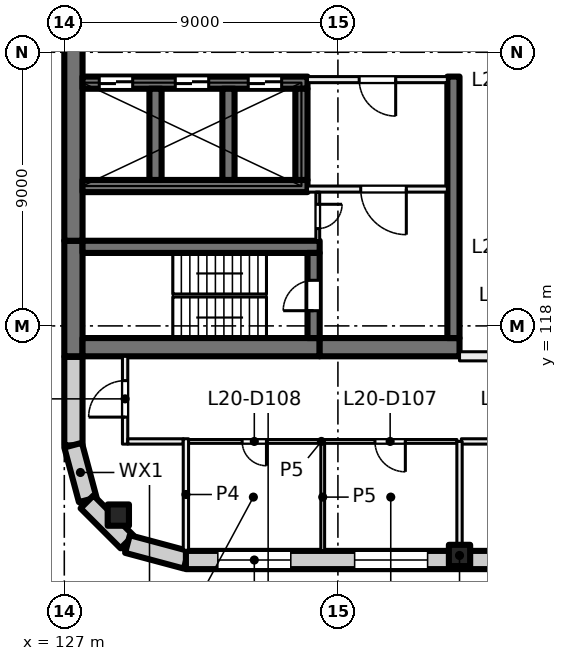
"""IFC4 building model, lengths in metres.
Left out: names, types, materials, properties, quantities, classifications, styles, units other than length and angle.
Written with IfcOpenShell. Run it as: python <this file> out.ifc"""

import sys

from ifc_helpers import new_model, si_unit, direction, frame, frame_2d, origin, origin_2d, place, context, subcontext, project, spatial, rectangle, extrude, element, fill, save


model = new_model("IFC4")
c1 = context("Model", 3, precision=1e-05, world=origin(), true_north=direction((0.0, 1.0)))
c2 = subcontext(c1, "Body", "Model", "MODEL_VIEW")
j1 = project(units=[si_unit("LENGTHUNIT", "METRE"), si_unit("PLANEANGLEUNIT", "RADIAN")], contexts=[c1])
p1 = place(None, origin())
s1 = spatial("IfcSite", under=j1, at=p1, CompositionType="ELEMENT")
p2 = place(p1, origin())
s2 = spatial("IfcBuilding", under=s1, at=p2, CompositionType="ELEMENT")
p3 = place(p2, frame((0.0, 0.0, 89.0)))
s3 = spatial("IfcBuildingStorey", under=s2, at=p3, CompositionType="ELEMENT", Elevation=89.0)
for number, where, z_axis, x_axis in (
    (1, (128.777, 111.777, 0.0), (0.0, 0.0, 1.0), (1.0, 0.0, 0.0)),
    (2, (140.0, 110.45, 0.0), (0.0, 0.0, 1.0), (1.0, 0.0, 0.0)),
):
    element("IfcColumn", number, at=place(p3, frame(where, z_axis=z_axis, x_axis=x_axis)), inside=s3, PredefinedType="COLUMN", context=c2, shape_type="SweptSolid", body=[
        extrude(rectangle(XDim=0.7, YDim=0.7, at=origin_2d()), origin(), (0.0, 0.0, 1.0), 4.0),
    ])
p4 = place(p3, frame((127.3, 117.0, 0.0), z_axis=(0.0, 0.0, 1.0), x_axis=(0.0, 1.0, 0.0)))
e3 = element("IfcWall", 3, at=p4, inside=s3, PredefinedType="SHEAR", context=c2, shape_type="SweptSolid", body=[
    extrude(rectangle(XDim=3.8, YDim=0.6, at=frame_2d((1.9, 0.0))), origin(), (0.0, 0.0, 1.0), 4.0),
])
p5 = place(p3, frame((127.3, 120.8, 0.0), z_axis=(0.0, 0.0, 1.0), x_axis=(0.0, 1.0, 0.0)))
e4 = element("IfcWall", 4, at=p5, inside=s3, PredefinedType="SHEAR", context=c2, shape_type="SweptSolid", body=[
    extrude(rectangle(XDim=14.4, YDim=0.6, at=frame_2d((7.2, 0.0))), origin(), (0.0, 0.0, 1.0), 4.0),
])
p6 = place(p3, frame((127.6, 117.3, 0.0), z_axis=(0.0, 0.0, 1.0), x_axis=(1.0, 0.0, 0.0)))
e5 = element("IfcWall", 5, at=p6, inside=s3, PredefinedType="SHEAR", context=c2, shape_type="SweptSolid", body=[
    extrude(rectangle(XDim=7.8, YDim=0.6, at=frame_2d((3.9, 0.0))), origin(), (0.0, 0.0, 1.0), 4.0),
])
p7 = place(p3, frame((135.4, 117.3, 0.0), z_axis=(0.0, 0.0, 1.0), x_axis=(1.0, 0.0, 0.0)))
e6 = element("IfcWall", 6, at=p7, inside=s3, PredefinedType="SHEAR", context=c2, shape_type="SweptSolid", body=[
    extrude(rectangle(XDim=4.6, YDim=0.6, at=frame_2d((2.3, 0.0))), origin(), (0.0, 0.0, 1.0), 4.0),
])
p8 = place(p3, frame((127.6, 120.6, 0.0), z_axis=(0.0, 0.0, 1.0), x_axis=(1.0, 0.0, 0.0)))
e7 = element("IfcWall", 7, at=p8, inside=s3, PredefinedType="SHEAR", context=c2, shape_type="SweptSolid", body=[
    extrude(rectangle(XDim=7.8, YDim=0.4, at=frame_2d((3.9, 0.0))), origin(), (0.0, 0.0, 1.0), 4.0),
])
p9 = place(p3, frame((135.2, 117.6, 0.0), z_axis=(0.0, 0.0, 1.0), x_axis=(0.0, 1.0, 0.0)))
e8 = element("IfcWall", 8, at=p9, inside=s3, PredefinedType="SHEAR", context=c2, shape_type="SweptSolid", body=[
    extrude(rectangle(XDim=2.8, YDim=0.4, at=frame_2d((1.4, 0.0))), origin(), (0.0, 0.0, 1.0), 4.0),
])
p10 = place(p9, frame((0.9, 0.0, 0.0)))
e9 = element("IfcOpeningElement", 9, at=p10, cuts=e8, PredefinedType="OPENING", context=c2, shape_type="SweptSolid", body=[
    extrude(rectangle(XDim=1.0, YDim=2.1, at=frame_2d((0.5, 1.05))), frame((0.0, 0.21, 0.0), z_axis=(0.0, -1.0, 0.0), x_axis=(1.0, 0.0, 0.0)), (0.0, 0.0, 1.0), 0.42),
])
p11 = place(p3, frame((127.6, 126.0, 0.0), z_axis=(0.0, 0.0, 1.0), x_axis=(1.0, 0.0, 0.0)))
e10 = element("IfcWall", 10, at=p11, inside=s3, PredefinedType="SHEAR", context=c2, shape_type="SweptSolid", body=[
    extrude(rectangle(XDim=7.4, YDim=0.4, at=frame_2d((3.7, 0.0))), origin(), (0.0, 0.0, 1.0), 4.0),
])
p12 = place(p11, frame((0.55, 0.0, 0.0)))
e11 = element("IfcOpeningElement", 11, at=p12, cuts=e10, PredefinedType="OPENING", context=c2, shape_type="SweptSolid", body=[
    extrude(rectangle(XDim=1.1, YDim=2.1, at=frame_2d((0.55, 1.05))), frame((0.0, 0.21, 0.0), z_axis=(0.0, -1.0, 0.0), x_axis=(1.0, 0.0, 0.0)), (0.0, 0.0, 1.0), 0.42),
])
p13 = place(p11, frame((3.05, 0.0, 0.0)))
e12 = element("IfcOpeningElement", 12, at=p13, cuts=e10, PredefinedType="OPENING", context=c2, shape_type="SweptSolid", body=[
    extrude(rectangle(XDim=1.1, YDim=2.1, at=frame_2d((0.55, 1.05))), frame((0.0, 0.21, 0.0), z_axis=(0.0, -1.0, 0.0), x_axis=(1.0, 0.0, 0.0)), (0.0, 0.0, 1.0), 0.42),
])
p14 = place(p11, frame((5.45, 0.0, 0.0)))
e13 = element("IfcOpeningElement", 13, at=p14, cuts=e10, PredefinedType="OPENING", context=c2, shape_type="SweptSolid", body=[
    extrude(rectangle(XDim=1.1, YDim=2.1, at=frame_2d((0.55, 1.05))), frame((0.0, 0.21, 0.0), z_axis=(0.0, -1.0, 0.0), x_axis=(1.0, 0.0, 0.0)), (0.0, 0.0, 1.0), 0.42),
])
p15 = place(p3, frame((127.6, 122.6, 0.0), z_axis=(0.0, 0.0, 1.0), x_axis=(1.0, 0.0, 0.0)))
e14 = element("IfcWall", 14, at=p15, inside=s3, PredefinedType="SHEAR", context=c2, shape_type="SweptSolid", body=[
    extrude(rectangle(XDim=7.4, YDim=0.4, at=frame_2d((3.7, 0.0))), origin(), (0.0, 0.0, 1.0), 4.0),
])
for number, where, z_axis, x_axis in (
    (15, (130.0, 122.8, 0.0), (0.0, 0.0, 1.0), (0.0, 1.0, 0.0)),
    (16, (132.4, 122.8, 0.0), (0.0, 0.0, 1.0), (0.0, 1.0, 0.0)),
    (17, (134.8, 122.8, 0.0), (0.0, 0.0, 1.0), (0.0, 1.0, 0.0)),
):
    element("IfcWall", number, at=place(p3, frame(where, z_axis=z_axis, x_axis=x_axis)), inside=s3, PredefinedType="SHEAR", context=c2, shape_type="SweptSolid", body=[
        extrude(rectangle(XDim=3.0, YDim=0.4, at=frame_2d((1.5, 0.0))), origin(), (0.0, 0.0, 1.0), 4.0),
    ])
p16 = place(p3, frame((139.8, 117.6, 0.0), z_axis=(0.0, 0.0, 1.0), x_axis=(0.0, 1.0, 0.0)))
e18 = element("IfcWall", 18, at=p16, inside=s3, PredefinedType="SHEAR", context=c2, shape_type="SweptSolid", body=[
    extrude(rectangle(XDim=8.6, YDim=0.4, at=frame_2d((4.3, 0.0))), origin(), (0.0, 0.0, 1.0), 4.0),
])
p17 = place(p3, frame((127.3, 114.07, 0.0), z_axis=(0.0, 0.0, 1.0), x_axis=(0.0, 1.0, 0.0)))
e19 = element("IfcWall", 19, at=p17, inside=s3, PredefinedType="SOLIDWALL", context=c2, shape_type="SweptSolid", body=[
    extrude(rectangle(XDim=2.91, YDim=0.6, at=frame_2d((1.455, 0.0))), origin(), (0.0, 0.0, 1.0), 3.625),
])
for number, where, z_axis, x_axis in (
    (20, (127.771, 112.281, 0.0), (0.0, 0.0, 1.0), (-0.259, 0.966, 0.0)),
    (21, (129.064, 110.896, 0.0), (0.0, 0.0, 1.0), (-0.707, 0.707, 0.0)),
):
    element("IfcWall", number, at=place(p3, frame(where, z_axis=z_axis, x_axis=x_axis)), inside=s3, PredefinedType="SOLIDWALL", context=c2, shape_type="SweptSolid", body=[
        extrude(rectangle(XDim=1.861, YDim=0.6, at=frame_2d((0.93, 0.0))), origin(), (0.0, 0.0, 1.0), 3.625),
    ])
p18 = place(p3, frame((131.01, 110.308, 0.0), z_axis=(0.0, 0.0, 1.0), x_axis=(-0.965920269068, 0.258839784042, 0.0)))
e22 = element("IfcWall", 22, at=p18, inside=s3, PredefinedType="SOLIDWALL", context=c2, shape_type="SweptSolid", body=[
    extrude(rectangle(XDim=2.0, YDim=0.6, at=frame_2d((1.0, 0.0))), origin(), (0.0, 0.0, 1.0), 3.625),
])
p19 = place(p3, frame((144.93, 110.3, 0.0), z_axis=(0.0, 0.0, 1.0), x_axis=(-1.0, 0.0, 0.0)))
e23 = element("IfcWall", 23, at=p19, inside=s3, PredefinedType="SOLIDWALL", context=c2, shape_type="SweptSolid", body=[
    extrude(rectangle(XDim=13.93, YDim=0.6, at=frame_2d((6.965, 0.0))), origin(), (0.0, 0.0, 1.0), 3.625),
])
p20 = place(p19, frame((1.48, 0.0, 0.9)))
e24 = element("IfcOpeningElement", 24, at=p20, cuts=e23, PredefinedType="OPENING", context=c2, shape_type="SweptSolid", body=[
    extrude(rectangle(XDim=2.4, YDim=2.4, at=frame_2d((1.2, 1.2))), frame((0.0, 0.31, 0.0), z_axis=(0.0, -1.0, 0.0), x_axis=(1.0, 0.0, 0.0)), (0.0, 0.0, 1.0), 0.62),
])
p21 = place(p19, frame((5.98, 0.0, 0.9)))
e25 = element("IfcOpeningElement", 25, at=p21, cuts=e23, PredefinedType="OPENING", context=c2, shape_type="SweptSolid", body=[
    extrude(rectangle(XDim=2.4, YDim=2.4, at=frame_2d((1.2, 1.2))), frame((0.0, 0.31, 0.0), z_axis=(0.0, -1.0, 0.0), x_axis=(1.0, 0.0, 0.0)), (0.0, 0.0, 1.0), 0.62),
])
p22 = place(p19, frame((10.48, 0.0, 0.9)))
e26 = element("IfcOpeningElement", 26, at=p22, cuts=e23, PredefinedType="OPENING", context=c2, shape_type="SweptSolid", body=[
    extrude(rectangle(XDim=2.4, YDim=2.4, at=frame_2d((1.2, 1.2))), frame((0.0, 0.31, 0.0), z_axis=(0.0, -1.0, 0.0), x_axis=(1.0, 0.0, 0.0)), (0.0, 0.0, 1.0), 0.62),
])
p23 = place(p3, frame((139.6, 126.1, 0.0), z_axis=(0.0, 0.0, 1.0), x_axis=(-1.0, 0.0, 0.0)))
e27 = element("IfcWall", 27, at=p23, inside=s3, PredefinedType="PARTITIONING", context=c2, shape_type="SweptSolid", body=[
    extrude(rectangle(XDim=4.6, YDim=0.2, at=frame_2d((2.3, 0.0))), origin(), (0.0, 0.0, 1.0), 3.625),
])
p24 = place(p23, frame((1.7, 0.0, 0.0)))
e28 = element("IfcOpeningElement", 28, at=p24, cuts=e27, PredefinedType="OPENING", context=c2, shape_type="SweptSolid", body=[
    extrude(rectangle(XDim=1.2, YDim=2.1, at=frame_2d((0.6, 1.05))), frame((0.0, 0.11, 0.0), z_axis=(0.0, -1.0, 0.0), x_axis=(1.0, 0.0, 0.0)), (0.0, 0.0, 1.0), 0.22),
])
p25 = place(p3, frame((139.6, 122.5, 0.0), z_axis=(0.0, 0.0, 1.0), x_axis=(-1.0, 0.0, 0.0)))
e29 = element("IfcWall", 29, at=p25, inside=s3, PredefinedType="PARTITIONING", context=c2, shape_type="SweptSolid", body=[
    extrude(rectangle(XDim=4.6, YDim=0.2, at=frame_2d((2.3, 0.0))), origin(), (0.0, 0.0, 1.0), 3.625),
])
p26 = place(p25, frame((1.35, 0.0, 0.0)))
e30 = element("IfcOpeningElement", 30, at=p26, cuts=e29, PredefinedType="OPENING", context=c2, shape_type="SweptSolid", body=[
    extrude(rectangle(XDim=1.5, YDim=2.1, at=frame_2d((0.75, 1.05))), frame((0.0, 0.11, 0.0), z_axis=(0.0, -1.0, 0.0), x_axis=(1.0, 0.0, 0.0)), (0.0, 0.0, 1.0), 0.22),
])
p27 = place(p3, frame((135.337, 122.4, 0.0), z_axis=(0.0, 0.0, 1.0), x_axis=(0.0, -1.0, 0.0)))
e31 = element("IfcWall", 31, at=p27, inside=s3, PredefinedType="PARTITIONING", context=c2, shape_type="SweptSolid", body=[
    extrude(rectangle(XDim=1.6, YDim=0.125, at=frame_2d((0.8, 0.0))), origin(), (0.0, 0.0, 1.0), 3.625),
])
p28 = place(p27, frame((0.4, 0.0, 0.0)))
e32 = element("IfcOpeningElement", 32, at=p28, cuts=e31, PredefinedType="OPENING", context=c2, shape_type="SweptSolid", body=[
    extrude(rectangle(XDim=0.8, YDim=2.1, at=frame_2d((0.4, 1.05))), frame((0.0, 0.073, 0.0), z_axis=(0.0, -1.0, 0.0), x_axis=(1.0, 0.0, 0.0)), (0.0, 0.0, 1.0), 0.145),
])
p29 = place(p3, frame((129.0, 114.112, 0.0), z_axis=(0.0, 0.0, 1.0), x_axis=(0.0, 1.0, 0.0)))
e33 = element("IfcWall", 33, at=p29, inside=s3, PredefinedType="PARTITIONING", context=c2, shape_type="SweptSolid", body=[
    extrude(rectangle(XDim=2.888, YDim=0.175, at=frame_2d((1.444, 0.0))), origin(), (0.0, 0.0, 1.0), 3.625),
])
p30 = place(p29, frame((0.888, 0.0, 0.0)))
e34 = element("IfcOpeningElement", 34, at=p30, cuts=e33, PredefinedType="OPENING", context=c2, shape_type="SweptSolid", body=[
    extrude(rectangle(XDim=1.2, YDim=2.1, at=frame_2d((0.6, 1.05))), frame((0.0, 0.097, 0.0), z_axis=(0.0, -1.0, 0.0), x_axis=(1.0, 0.0, 0.0)), (0.0, 0.0, 1.0), 0.195),
])
p31 = place(p3, frame((130.912, 114.2, 0.0), z_axis=(0.0, 0.0, 1.0), x_axis=(-1.0, 0.0, 0.0)))
e35 = element("IfcWall", 35, at=p31, inside=s3, PredefinedType="PARTITIONING", context=c2, shape_type="SweptSolid", body=[
    extrude(rectangle(XDim=1.824, YDim=0.175, at=frame_2d((0.912, 0.0))), origin(), (0.0, 0.0, 1.0), 3.625),
])
p32 = place(p3, frame((139.916, 114.2, 0.0), z_axis=(0.0, 0.0, 1.0), x_axis=(-1.0, 0.0, 0.0)))
e36 = element("IfcWall", 36, at=p32, inside=s3, PredefinedType="PARTITIONING", context=c2, shape_type="SweptSolid", body=[
    extrude(rectangle(XDim=8.919, YDim=0.125, at=frame_2d((4.459, 0.0))), origin(), (0.0, 0.0, 1.0), 3.625),
])
p33 = place(p32, frame((1.698, 0.0, 0.0)))
e37 = element("IfcOpeningElement", 37, at=p33, cuts=e36, PredefinedType="OPENING", context=c2, shape_type="SweptSolid", body=[
    extrude(rectangle(XDim=1.0, YDim=2.1, at=frame_2d((0.5, 1.05))), frame((0.0, 0.073, 0.0), z_axis=(0.0, -1.0, 0.0), x_axis=(1.0, 0.0, 0.0)), (0.0, 0.0, 1.0), 0.145),
])
p34 = place(p32, frame((6.266, 0.0, 0.0)))
e38 = element("IfcOpeningElement", 38, at=p34, cuts=e36, PredefinedType="OPENING", context=c2, shape_type="SweptSolid", body=[
    extrude(rectangle(XDim=0.8, YDim=2.1, at=frame_2d((0.4, 1.05))), frame((0.0, 0.073, 0.0), z_axis=(0.0, -1.0, 0.0), x_axis=(1.0, 0.0, 0.0)), (0.0, 0.0, 1.0), 0.145),
])
p35 = place(p3, frame((131.0, 114.288, 0.0), z_axis=(0.0, 0.0, 1.0), x_axis=(0.0, -1.0, 0.0)))
e39 = element("IfcWall", 39, at=p35, inside=s3, PredefinedType="PARTITIONING", context=c2, shape_type="SweptSolid", body=[
    extrude(rectangle(XDim=3.667, YDim=0.175, at=frame_2d((1.833, 0.0))), origin(), (0.0, 0.0, 1.0), 3.625),
])
p36 = place(p3, frame((135.5, 110.6, 0.0), z_axis=(0.0, 0.0, 1.0), x_axis=(0.0, 1.0, 0.0)))
e40 = element("IfcWall", 40, at=p36, inside=s3, PredefinedType="PARTITIONING", context=c2, shape_type="SweptSolid", body=[
    extrude(rectangle(XDim=3.538, YDim=0.125, at=frame_2d((1.769, 0.0))), origin(), (0.0, 0.0, 1.0), 3.625),
])
p37 = place(p3, frame((144.412, 114.2, 0.0), z_axis=(0.0, 0.0, 1.0), x_axis=(-1.0, 0.0, 0.0)))
e41 = element("IfcWall", 41, at=p37, inside=s3, PredefinedType="PARTITIONING", context=c2, shape_type="SweptSolid", body=[
    extrude(rectangle(XDim=4.352, YDim=0.175, at=frame_2d((2.176, 0.0))), origin(), (0.0, 0.0, 1.0), 3.625),
])
p38 = place(p37, frame((1.576, 0.0, 0.0)))
e42 = element("IfcOpeningElement", 42, at=p38, cuts=e41, PredefinedType="OPENING", context=c2, shape_type="SweptSolid", body=[
    extrude(rectangle(XDim=1.2, YDim=2.1, at=frame_2d((0.6, 1.05))), frame((0.0, 0.097, 0.0), z_axis=(0.0, -1.0, 0.0), x_axis=(1.0, 0.0, 0.0)), (0.0, 0.0, 1.0), 0.195),
])
p39 = place(p3, frame((140.0, 110.6, 0.0), z_axis=(0.0, 0.0, 1.0), x_axis=(0.0, 1.0, 0.0)))
e43 = element("IfcWall", 43, at=p39, inside=s3, PredefinedType="PARTITIONING", context=c2, shape_type="SweptSolid", body=[
    extrude(rectangle(XDim=3.6, YDim=0.175, at=frame_2d((1.8, 0.0))), origin(), (0.0, 0.0, 1.0), 3.625),
])
p40 = place(p3, frame((140.0, 117.0, 0.0), z_axis=(0.0, 0.0, 1.0), x_axis=(1.0, 0.0, 0.0)))
e44 = element("IfcWall", 44, at=p40, inside=s3, PredefinedType="PARTITIONING", context=c2, shape_type="SweptSolid", body=[
    extrude(rectangle(XDim=4.35, YDim=0.3, at=frame_2d((2.175, 0.0))), origin(), (0.0, 0.0, 1.0), 3.625),
])
p41 = place(p40, frame((1.684, 0.0, 0.0)))
e45 = element("IfcOpeningElement", 45, at=p41, cuts=e44, PredefinedType="OPENING", context=c2, shape_type="SweptSolid", body=[
    extrude(rectangle(XDim=1.0, YDim=2.1, at=frame_2d((0.5, 1.05))), frame((0.0, 0.16, 0.0), z_axis=(0.0, -1.0, 0.0), x_axis=(1.0, 0.0, 0.0)), (0.0, 0.0, 1.0), 0.32),
])
p42 = place(p21, origin())
e46 = element("IfcWindow", 46, at=p42, inside=s3, PartitioningType="SINGLE_PANEL", PredefinedType="WINDOW", context=c2, shape_type="SweptSolid", body=[
    extrude(rectangle(XDim=2.4, YDim=2.4, at=frame_2d((1.2, 1.2))), frame((0.0, 0.03, 0.0), z_axis=(0.0, -1.0, 0.0), x_axis=(1.0, 0.0, 0.0)), (0.0, 0.0, 1.0), 0.06),
])
fill(e25, e46)
p43 = place(p22, origin())
e47 = element("IfcWindow", 47, at=p43, inside=s3, PartitioningType="SINGLE_PANEL", PredefinedType="WINDOW", context=c2, shape_type="SweptSolid", body=[
    extrude(rectangle(XDim=2.4, YDim=2.4, at=frame_2d((1.2, 1.2))), frame((0.0, 0.03, 0.0), z_axis=(0.0, -1.0, 0.0), x_axis=(1.0, 0.0, 0.0)), (0.0, 0.0, 1.0), 0.06),
])
fill(e26, e47)
p44 = place(p12, origin())
e48 = element("IfcDoor", 48, at=p44, inside=s3, OperationType="DOUBLE_DOOR_SLIDING", PredefinedType="DOOR", context=c2, shape_type="SweptSolid", body=[
    extrude(rectangle(XDim=1.1, YDim=2.1, at=frame_2d((0.55, 1.05))), frame((0.0, 0.025, 0.0), z_axis=(0.0, -1.0, 0.0), x_axis=(1.0, 0.0, 0.0)), (0.0, 0.0, 1.0), 0.05),
])
fill(e11, e48)
p45 = place(p13, origin())
e49 = element("IfcDoor", 49, at=p45, inside=s3, OperationType="DOUBLE_DOOR_SLIDING", PredefinedType="DOOR", context=c2, shape_type="SweptSolid", body=[
    extrude(rectangle(XDim=1.1, YDim=2.1, at=frame_2d((0.55, 1.05))), frame((0.0, 0.025, 0.0), z_axis=(0.0, -1.0, 0.0), x_axis=(1.0, 0.0, 0.0)), (0.0, 0.0, 1.0), 0.05),
])
fill(e12, e49)
p46 = place(p14, origin())
e50 = element("IfcDoor", 50, at=p46, inside=s3, OperationType="DOUBLE_DOOR_SLIDING", PredefinedType="DOOR", context=c2, shape_type="SweptSolid", body=[
    extrude(rectangle(XDim=1.1, YDim=2.1, at=frame_2d((0.55, 1.05))), frame((0.0, 0.025, 0.0), z_axis=(0.0, -1.0, 0.0), x_axis=(1.0, 0.0, 0.0)), (0.0, 0.0, 1.0), 0.05),
])
fill(e13, e50)
p47 = place(p24, origin())
e51 = element("IfcDoor", 51, at=p47, inside=s3, OperationType="DOUBLE_DOOR_SINGLE_SWING", PredefinedType="DOOR", context=c2, shape_type="SweptSolid", body=[
    extrude(rectangle(XDim=1.2, YDim=2.1, at=frame_2d((0.6, 1.05))), frame((0.0, 0.025, 0.0), z_axis=(0.0, -1.0, 0.0), x_axis=(1.0, 0.0, 0.0)), (0.0, 0.0, 1.0), 0.05),
])
fill(e28, e51)
p48 = place(p26, origin())
e52 = element("IfcDoor", 52, at=p48, inside=s3, OperationType="DOUBLE_DOOR_SINGLE_SWING", PredefinedType="DOOR", context=c2, shape_type="SweptSolid", body=[
    extrude(rectangle(XDim=1.5, YDim=2.1, at=frame_2d((0.75, 1.05))), frame((0.0, 0.025, 0.0), z_axis=(0.0, -1.0, 0.0), x_axis=(1.0, 0.0, 0.0)), (0.0, 0.0, 1.0), 0.05),
])
fill(e30, e52)
p49 = place(p10, origin())
e53 = element("IfcDoor", 53, at=p49, inside=s3, OperationType="SINGLE_SWING_RIGHT", PredefinedType="DOOR", context=c2, shape_type="SweptSolid", body=[
    extrude(rectangle(XDim=1.0, YDim=2.1, at=frame_2d((0.5, 1.05))), frame((0.0, 0.025, 0.0), z_axis=(0.0, -1.0, 0.0), x_axis=(1.0, 0.0, 0.0)), (0.0, 0.0, 1.0), 0.05),
])
fill(e9, e53)
p50 = place(p28, origin())
e54 = element("IfcDoor", 54, at=p50, inside=s3, OperationType="SINGLE_SWING_LEFT", PredefinedType="DOOR", context=c2, shape_type="SweptSolid", body=[
    extrude(rectangle(XDim=0.8, YDim=2.1, at=frame_2d((0.4, 1.05))), frame((0.0, 0.025, 0.0), z_axis=(0.0, -1.0, 0.0), x_axis=(1.0, 0.0, 0.0)), (0.0, 0.0, 1.0), 0.05),
])
fill(e32, e54)
p51 = place(p33, origin())
e55 = element("IfcDoor", 55, at=p51, inside=s3, OperationType="SINGLE_SWING_LEFT", PredefinedType="DOOR", context=c2, shape_type="SweptSolid", body=[
    extrude(rectangle(XDim=1.0, YDim=2.1, at=frame_2d((0.5, 1.05))), frame((0.0, 0.025, 0.0), z_axis=(0.0, -1.0, 0.0), x_axis=(1.0, 0.0, 0.0)), (0.0, 0.0, 1.0), 0.05),
])
fill(e37, e55)
p52 = place(p34, origin())
e56 = element("IfcDoor", 56, at=p52, inside=s3, OperationType="SINGLE_SWING_RIGHT", PredefinedType="DOOR", context=c2, shape_type="SweptSolid", body=[
    extrude(rectangle(XDim=0.8, YDim=2.1, at=frame_2d((0.4, 1.05))), frame((0.0, 0.025, 0.0), z_axis=(0.0, -1.0, 0.0), x_axis=(1.0, 0.0, 0.0)), (0.0, 0.0, 1.0), 0.05),
])
fill(e38, e56)
p53 = place(p30, origin())
e57 = element("IfcDoor", 57, at=p53, inside=s3, OperationType="DOUBLE_DOOR_SINGLE_SWING", PredefinedType="DOOR", context=c2, shape_type="SweptSolid", body=[
    extrude(rectangle(XDim=1.2, YDim=2.1, at=frame_2d((0.6, 1.05))), frame((0.0, 0.025, 0.0), z_axis=(0.0, -1.0, 0.0), x_axis=(1.0, 0.0, 0.0)), (0.0, 0.0, 1.0), 0.05),
])
fill(e34, e57)
save(model, sys.argv[1])
